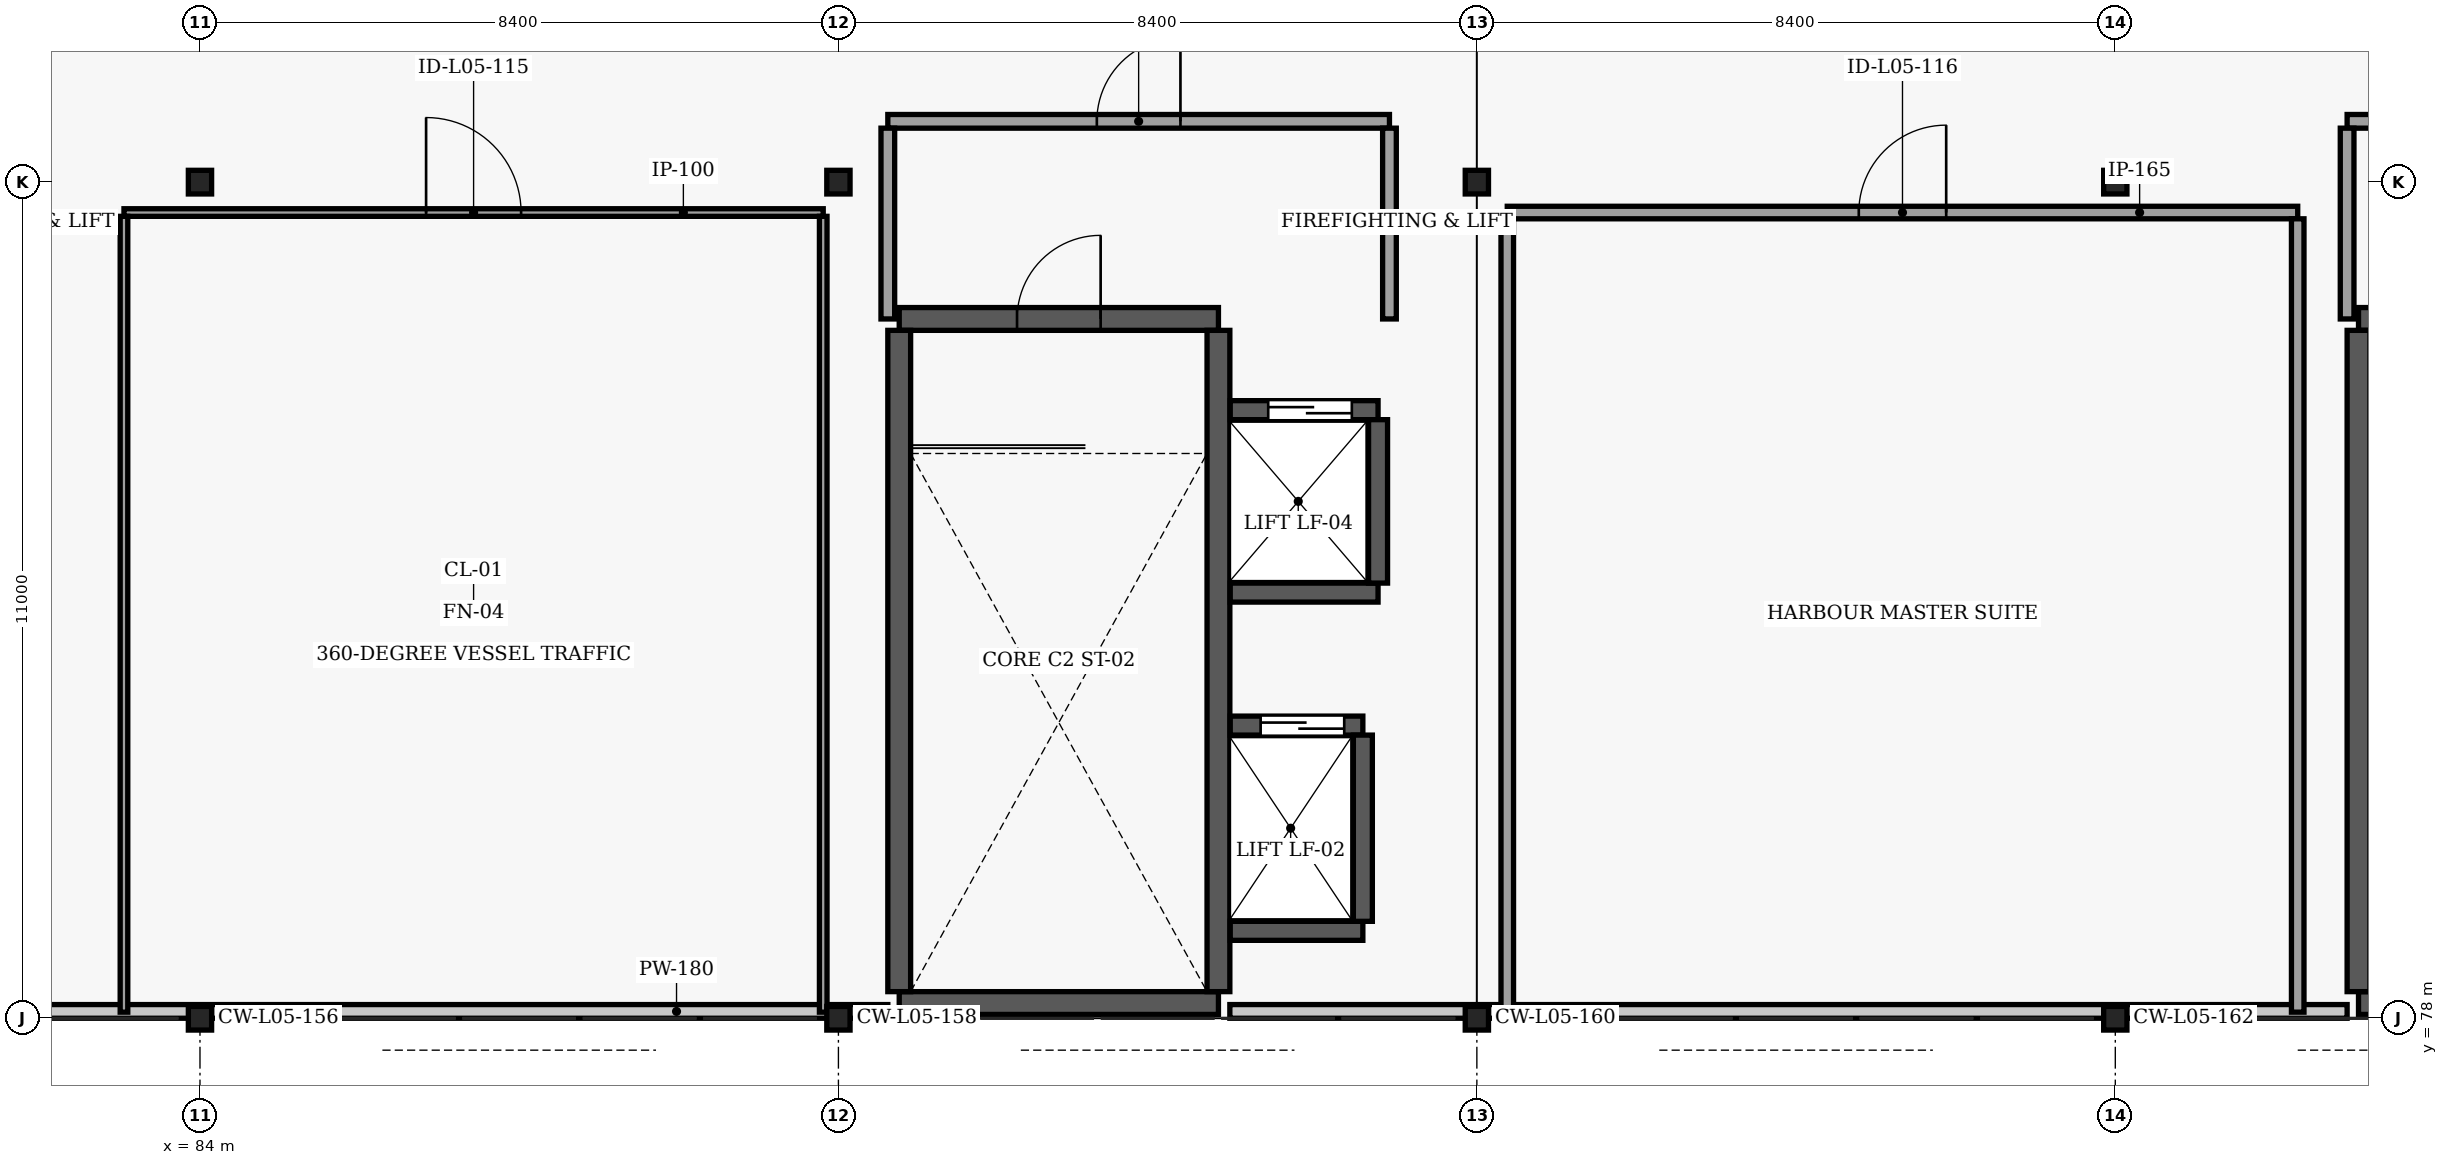
"""IFC4 building model, lengths in metres.
Left out: names, types, materials, properties, quantities, classifications, styles, units other than length and angle.
Written with IfcOpenShell. Run it as: python <this file> out.ifc"""

import sys

from ifc_helpers import new_model, si_unit, direction, frame, frame_2d, origin, origin_2d, place, context, subcontext, project, spatial, rectangle, i_section, extrude, element, fill, save


model = new_model("IFC4")
c1 = context("Model", 3, precision=1e-05, world=origin(), true_north=direction((0.0, 1.0)))
c2 = subcontext(c1, "Body", "Model", "MODEL_VIEW")
j1 = project(units=[si_unit("LENGTHUNIT", "METRE"), si_unit("PLANEANGLEUNIT", "RADIAN")], contexts=[c1])
p1 = place(None, origin())
s1 = spatial("IfcSite", under=j1, at=p1, CompositionType="ELEMENT")
p2 = place(p1, origin())
s2 = spatial("IfcBuilding", under=s1, at=p2, CompositionType="ELEMENT")
p3 = place(p2, frame((0.0, 0.0, 18.6)))
s3 = spatial("IfcBuildingStorey", under=s2, at=p3, CompositionType="ELEMENT", Elevation=18.6)
for number, where, z_axis, x_axis in (
    (1, (84.0, 78.0, 0.0), (0.0, 0.0, 1.0), (1.0, 0.0, 0.0)),
    (2, (92.4, 78.0, 0.0), (0.0, 0.0, 1.0), (1.0, 0.0, 0.0)),
    (3, (100.8, 78.0, 0.0), (0.0, 0.0, 1.0), (1.0, 0.0, 0.0)),
    (4, (109.2, 78.0, 0.0), (0.0, 0.0, 1.0), (1.0, 0.0, 0.0)),
    (5, (84.0, 89.0, 0.0), (0.0, 0.0, 1.0), (1.0, 0.0, 0.0)),
    (6, (92.4, 89.0, 0.0), (0.0, 0.0, 1.0), (1.0, 0.0, 0.0)),
    (7, (100.8, 89.0, 0.0), (0.0, 0.0, 1.0), (1.0, 0.0, 0.0)),
    (8, (109.2, 89.0, 0.0), (0.0, 0.0, 1.0), (1.0, 0.0, 0.0)),
):
    element("IfcColumn", number, at=place(p3, frame(where, z_axis=z_axis, x_axis=x_axis)), inside=s3, PredefinedType="COLUMN", context=c2, shape_type="SweptSolid", body=[
        extrude(i_section(OverallWidth=0.306, OverallDepth=0.311, WebThickness=0.011, FlangeThickness=0.017, FilletRadius=0.015, at=origin_2d()), origin(), (0.0, 0.0, 1.0), 3.96),
    ])
p4 = place(p3, frame((93.2, 78.2, 0.0), z_axis=(0.0, 0.0, 1.0), x_axis=(1.0, 0.0, 0.0)))
e9 = element("IfcWall", 9, at=p4, inside=s3, PredefinedType="SHEAR", context=c2, shape_type="SweptSolid", body=[
    extrude(rectangle(XDim=4.2, YDim=0.3, at=frame_2d((2.1, 0.0))), origin(), (0.0, 0.0, 1.0), 5.1),
])
p5 = place(p3, frame((93.2, 87.2, 0.0), z_axis=(0.0, 0.0, 1.0), x_axis=(1.0, 0.0, 0.0)))
e10 = element("IfcWall", 10, at=p5, inside=s3, PredefinedType="SHEAR", context=c2, shape_type="SweptSolid", body=[
    extrude(rectangle(XDim=4.2, YDim=0.3, at=frame_2d((2.1, 0.0))), origin(), (0.0, 0.0, 1.0), 5.1),
])
p6 = place(p5, frame((1.55, 0.0, 0.0)))
e11 = element("IfcOpeningElement", 11, at=p6, cuts=e10, PredefinedType="OPENING", context=c2, shape_type="SweptSolid", body=[
    extrude(rectangle(XDim=1.1, YDim=2.2, at=frame_2d((0.55, 1.1))), frame((0.0, 0.16, 0.0), z_axis=(0.0, -1.0, 0.0), x_axis=(1.0, 0.0, 0.0)), (0.0, 0.0, 1.0), 0.32),
])
for number, where, z_axis, x_axis in (
    (12, (93.2, 78.35, 0.0), (0.0, 0.0, 1.0), (0.0, 1.0, 0.0)),
    (13, (97.4, 78.35, 0.0), (0.0, 0.0, 1.0), (0.0, 1.0, 0.0)),
):
    element("IfcWall", number, at=place(p3, frame(where, z_axis=z_axis, x_axis=x_axis)), inside=s3, PredefinedType="SHEAR", context=c2, shape_type="SweptSolid", body=[
        extrude(rectangle(XDim=8.7, YDim=0.3, at=frame_2d((4.35, 0.0))), origin(), (0.0, 0.0, 1.0), 5.1),
    ])
p7 = place(p3, frame((97.555, 79.15, 0.0), z_axis=(0.0, 0.0, 1.0), x_axis=(1.0, 0.0, 0.0)))
e14 = element("IfcWall", 14, at=p7, inside=s3, PredefinedType="SOLIDWALL", context=c2, shape_type="SweptSolid", body=[
    extrude(rectangle(XDim=1.745, YDim=0.25, at=frame_2d((0.873, 0.0))), origin(), (0.0, 0.0, 1.0), 5.88),
])
p8 = place(p3, frame((97.555, 81.85, 0.0), z_axis=(0.0, 0.0, 1.0), x_axis=(1.0, 0.0, 0.0)))
e15 = element("IfcWall", 15, at=p8, inside=s3, PredefinedType="SOLIDWALL", context=c2, shape_type="SweptSolid", body=[
    extrude(rectangle(XDim=1.745, YDim=0.25, at=frame_2d((0.873, 0.0))), origin(), (0.0, 0.0, 1.0), 5.88),
])
p9 = place(p8, frame((0.4, 0.0, 0.0)))
e16 = element("IfcOpeningElement", 16, at=p9, cuts=e15, PredefinedType="OPENING", context=c2, shape_type="SweptSolid", body=[
    extrude(rectangle(XDim=1.1, YDim=2.2, at=frame_2d((0.55, 1.1))), frame((0.0, 0.135, 0.0), z_axis=(0.0, -1.0, 0.0), x_axis=(1.0, 0.0, 0.0)), (0.0, 0.0, 1.0), 0.27),
])
p10 = place(p3, frame((99.3, 79.275, 0.0), z_axis=(0.0, 0.0, 1.0), x_axis=(0.0, 1.0, 0.0)))
e17 = element("IfcWall", 17, at=p10, inside=s3, PredefinedType="SOLIDWALL", context=c2, shape_type="SweptSolid", body=[
    extrude(rectangle(XDim=2.45, YDim=0.25, at=frame_2d((1.225, 0.0))), origin(), (0.0, 0.0, 1.0), 5.88),
])
p11 = place(p3, frame((97.555, 83.6, 0.0), z_axis=(0.0, 0.0, 1.0), x_axis=(1.0, 0.0, 0.0)))
e18 = element("IfcWall", 18, at=p11, inside=s3, PredefinedType="SOLIDWALL", context=c2, shape_type="SweptSolid", body=[
    extrude(rectangle(XDim=1.945, YDim=0.25, at=frame_2d((0.973, 0.0))), origin(), (0.0, 0.0, 1.0), 5.88),
])
p12 = place(p3, frame((97.555, 86.0, 0.0), z_axis=(0.0, 0.0, 1.0), x_axis=(1.0, 0.0, 0.0)))
e19 = element("IfcWall", 19, at=p12, inside=s3, PredefinedType="SOLIDWALL", context=c2, shape_type="SweptSolid", body=[
    extrude(rectangle(XDim=1.945, YDim=0.25, at=frame_2d((0.973, 0.0))), origin(), (0.0, 0.0, 1.0), 5.88),
])
p13 = place(p12, frame((0.5, 0.0, 0.0)))
e20 = element("IfcOpeningElement", 20, at=p13, cuts=e19, PredefinedType="OPENING", context=c2, shape_type="SweptSolid", body=[
    extrude(rectangle(XDim=1.1, YDim=2.2, at=frame_2d((0.55, 1.1))), frame((0.0, 0.135, 0.0), z_axis=(0.0, -1.0, 0.0), x_axis=(1.0, 0.0, 0.0)), (0.0, 0.0, 1.0), 0.27),
])
p14 = place(p3, frame((99.5, 83.725, 0.0), z_axis=(0.0, 0.0, 1.0), x_axis=(0.0, 1.0, 0.0)))
e21 = element("IfcWall", 21, at=p14, inside=s3, PredefinedType="SOLIDWALL", context=c2, shape_type="SweptSolid", body=[
    extrude(rectangle(XDim=2.15, YDim=0.25, at=frame_2d((1.075, 0.0))), origin(), (0.0, 0.0, 1.0), 5.88),
])
p15 = place(p3, frame((112.4, 78.2, 0.0), z_axis=(0.0, 0.0, 1.0), x_axis=(1.0, 0.0, 0.0)))
e22 = element("IfcWall", 22, at=p15, inside=s3, PredefinedType="SHEAR", context=c2, shape_type="SweptSolid", body=[
    extrude(rectangle(XDim=4.1, YDim=0.3, at=frame_2d((2.05, 0.0))), origin(), (0.0, 0.0, 1.0), 5.1),
])
p16 = place(p3, frame((112.4, 87.2, 0.0), z_axis=(0.0, 0.0, 1.0), x_axis=(1.0, 0.0, 0.0)))
e23 = element("IfcWall", 23, at=p16, inside=s3, PredefinedType="SHEAR", context=c2, shape_type="SweptSolid", body=[
    extrude(rectangle(XDim=4.1, YDim=0.3, at=frame_2d((2.05, 0.0))), origin(), (0.0, 0.0, 1.0), 5.1),
])
p17 = place(p16, frame((1.5, 0.0, 0.0)))
e24 = element("IfcOpeningElement", 24, at=p17, cuts=e23, PredefinedType="OPENING", context=c2, shape_type="SweptSolid", body=[
    extrude(rectangle(XDim=1.1, YDim=2.2, at=frame_2d((0.55, 1.1))), frame((0.0, 0.16, 0.0), z_axis=(0.0, -1.0, 0.0), x_axis=(1.0, 0.0, 0.0)), (0.0, 0.0, 1.0), 0.32),
])
p18 = place(p3, frame((112.4, 78.35, 0.0), z_axis=(0.0, 0.0, 1.0), x_axis=(0.0, 1.0, 0.0)))
e25 = element("IfcWall", 25, at=p18, inside=s3, PredefinedType="SHEAR", context=c2, shape_type="SweptSolid", body=[
    extrude(rectangle(XDim=8.7, YDim=0.3, at=frame_2d((4.35, 0.0))), origin(), (0.0, 0.0, 1.0), 5.1),
])
p19 = place(p3, frame((79.15, 78.09, 4.2), z_axis=(0.0, 0.0, 1.0), x_axis=(1.0, 0.0, 0.0)))
e26 = element("IfcWall", 26, at=p19, inside=s3, PredefinedType="PARAPET", context=c2, shape_type="SweptSolid", body=[
    extrude(rectangle(XDim=13.9, YDim=0.18, at=frame_2d((6.95, 0.0))), origin(), (0.0, 0.0, 1.0), 1.2),
])
p20 = place(p3, frame((97.55, 78.09, 4.2), z_axis=(0.0, 0.0, 1.0), x_axis=(1.0, 0.0, 0.0)))
e27 = element("IfcWall", 27, at=p20, inside=s3, PredefinedType="PARAPET", context=c2, shape_type="SweptSolid", body=[
    extrude(rectangle(XDim=14.7, YDim=0.18, at=frame_2d((7.35, 0.0))), origin(), (0.0, 0.0, 1.0), 1.2),
])
p21 = place(p3, frame((93.05, 89.8, 0.0), z_axis=(0.0, 0.0, 1.0), x_axis=(1.0, 0.0, 0.0)))
e28 = element("IfcWall", 28, at=p21, inside=s3, PredefinedType="SOLIDWALL", context=c2, shape_type="SweptSolid", body=[
    extrude(rectangle(XDim=6.6, YDim=0.18, at=frame_2d((3.3, 0.0))), origin(), (0.0, 0.0, 1.0), 3.9),
])
p22 = place(p21, frame((2.75, 0.0, 0.0)))
e29 = element("IfcOpeningElement", 29, at=p22, cuts=e28, PredefinedType="OPENING", context=c2, shape_type="SweptSolid", body=[
    extrude(rectangle(XDim=1.1, YDim=2.2, at=frame_2d((0.55, 1.1))), frame((0.0, 0.1, 0.0), z_axis=(0.0, -1.0, 0.0), x_axis=(1.0, 0.0, 0.0)), (0.0, 0.0, 1.0), 0.2),
])
for number, where, z_axis, x_axis in (
    (30, (93.05, 87.2, 0.0), (0.0, 0.0, 1.0), (0.0, 1.0, 0.0)),
    (31, (99.65, 87.2, 0.0), (0.0, 0.0, 1.0), (0.0, 1.0, 0.0)),
):
    element("IfcWall", number, at=place(p3, frame(where, z_axis=z_axis, x_axis=x_axis)), inside=s3, PredefinedType="SOLIDWALL", context=c2, shape_type="SweptSolid", body=[
        extrude(rectangle(XDim=2.51, YDim=0.18, at=frame_2d((1.255, 0.0))), origin(), (0.0, 0.0, 1.0), 3.55),
    ])
p23 = place(p3, frame((112.25, 89.8, 0.0), z_axis=(0.0, 0.0, 1.0), x_axis=(1.0, 0.0, 0.0)))
e32 = element("IfcWall", 32, at=p23, inside=s3, PredefinedType="SOLIDWALL", context=c2, shape_type="SweptSolid", body=[
    extrude(rectangle(XDim=4.4, YDim=0.18, at=frame_2d((2.2, 0.0))), origin(), (0.0, 0.0, 1.0), 3.9),
])
p24 = place(p23, frame((1.65, 0.0, 0.0)))
e33 = element("IfcOpeningElement", 33, at=p24, cuts=e32, PredefinedType="OPENING", context=c2, shape_type="SweptSolid", body=[
    extrude(rectangle(XDim=1.1, YDim=2.2, at=frame_2d((0.55, 1.1))), frame((0.0, 0.1, 0.0), z_axis=(0.0, -1.0, 0.0), x_axis=(1.0, 0.0, 0.0)), (0.0, 0.0, 1.0), 0.2),
])
p25 = place(p3, frame((112.25, 87.2, 0.0), z_axis=(0.0, 0.0, 1.0), x_axis=(0.0, 1.0, 0.0)))
e34 = element("IfcWall", 34, at=p25, inside=s3, PredefinedType="SOLIDWALL", context=c2, shape_type="SweptSolid", body=[
    extrude(rectangle(XDim=2.51, YDim=0.18, at=frame_2d((1.255, 0.0))), origin(), (0.0, 0.0, 1.0), 3.55),
])
p26 = place(p3, frame((83.0, 88.6, 0.0), z_axis=(0.0, 0.0, 1.0), x_axis=(1.0, 0.0, 0.0)))
e35 = element("IfcWall", 35, at=p26, inside=s3, PredefinedType="MOVABLE", context=c2, shape_type="SweptSolid", body=[
    extrude(rectangle(XDim=9.2, YDim=0.1, at=frame_2d((4.6, 0.0))), origin(), (0.0, 0.0, 1.0), 3.604),
])
p27 = place(p26, frame((3.975, 0.0, 0.0)))
e36 = element("IfcOpeningElement", 36, at=p27, cuts=e35, PredefinedType="OPENING", context=c2, shape_type="SweptSolid", body=[
    extrude(rectangle(XDim=1.25, YDim=2.25, at=frame_2d((0.625, 1.125))), frame((0.0, 0.06, 0.0), z_axis=(0.0, -1.0, 0.0), x_axis=(1.0, 0.0, 0.0)), (0.0, 0.0, 1.0), 0.12),
])
p28 = place(p3, frame((83.0, 78.08, 0.0), z_axis=(0.0, 0.0, 1.0), x_axis=(0.0, 1.0, 0.0)))
e37 = element("IfcWall", 37, at=p28, inside=s3, PredefinedType="MOVABLE", context=c2, shape_type="SweptSolid", body=[
    extrude(rectangle(XDim=10.47, YDim=0.1, at=frame_2d((5.235, 0.0))), origin(), (0.0, 0.0, 1.0), 3.698),
])
p29 = place(p3, frame((92.2, 78.08, 0.0), z_axis=(0.0, 0.0, 1.0), x_axis=(0.0, 1.0, 0.0)))
e38 = element("IfcWall", 38, at=p29, inside=s3, PredefinedType="MOVABLE", context=c2, shape_type="SweptSolid", body=[
    extrude(rectangle(XDim=10.47, YDim=0.1, at=frame_2d((5.235, 0.0))), origin(), (0.0, 0.0, 1.0), 3.604),
])
p30 = place(p3, frame((101.2, 88.6, 0.0), z_axis=(0.0, 0.0, 1.0), x_axis=(1.0, 0.0, 0.0)))
e39 = element("IfcWall", 39, at=p30, inside=s3, PredefinedType="PARTITIONING", context=c2, shape_type="SweptSolid", body=[
    extrude(rectangle(XDim=10.4, YDim=0.165, at=frame_2d((5.2, 0.0))), origin(), (0.0, 0.0, 1.0), 3.604),
])
p31 = place(p30, frame((4.625, 0.0, 0.0)))
e40 = element("IfcOpeningElement", 40, at=p31, cuts=e39, PredefinedType="OPENING", context=c2, shape_type="SweptSolid", body=[
    extrude(rectangle(XDim=1.15, YDim=2.25, at=frame_2d((0.575, 1.125))), frame((0.0, 0.093, 0.0), z_axis=(0.0, -1.0, 0.0), x_axis=(1.0, 0.0, 0.0)), (0.0, 0.0, 1.0), 0.185),
])
for number, where, z_axis, x_axis in (
    (41, (101.2, 78.08, 0.0), (0.0, 0.0, 1.0), (0.0, 1.0, 0.0)),
    (42, (111.6, 78.08, 0.0), (0.0, 0.0, 1.0), (0.0, 1.0, 0.0)),
):
    element("IfcWall", number, at=place(p3, frame(where, z_axis=z_axis, x_axis=x_axis)), inside=s3, PredefinedType="PARTITIONING", context=c2, shape_type="SweptSolid", body=[
        extrude(rectangle(XDim=10.438, YDim=0.165, at=frame_2d((5.219, 0.0))), origin(), (0.0, 0.0, 1.0), 3.698),
    ])
p32 = place(p6, origin())
e43 = element("IfcDoor", 43, at=p32, inside=s3, OperationType="SINGLE_SWING_RIGHT", PredefinedType="DOOR", context=c2, shape_type="SweptSolid", body=[
    extrude(rectangle(XDim=1.1, YDim=2.2, at=frame_2d((0.55, 1.1))), frame((0.0, 0.025, 0.0), z_axis=(0.0, -1.0, 0.0), x_axis=(1.0, 0.0, 0.0)), (0.0, 0.0, 1.0), 0.05),
])
fill(e11, e43)
p33 = place(p9, origin())
e44 = element("IfcDoor", 44, at=p33, inside=s3, OperationType="SLIDING_TO_LEFT", PredefinedType="DOOR", context=c2, shape_type="SweptSolid", body=[
    extrude(rectangle(XDim=1.1, YDim=2.2, at=frame_2d((0.55, 1.1))), frame((0.0, 0.025, 0.0), z_axis=(0.0, -1.0, 0.0), x_axis=(1.0, 0.0, 0.0)), (0.0, 0.0, 1.0), 0.05),
])
fill(e16, e44)
p34 = place(p13, origin())
e45 = element("IfcDoor", 45, at=p34, inside=s3, OperationType="SLIDING_TO_LEFT", PredefinedType="DOOR", context=c2, shape_type="SweptSolid", body=[
    extrude(rectangle(XDim=1.1, YDim=2.2, at=frame_2d((0.55, 1.1))), frame((0.0, 0.025, 0.0), z_axis=(0.0, -1.0, 0.0), x_axis=(1.0, 0.0, 0.0)), (0.0, 0.0, 1.0), 0.05),
])
fill(e20, e45)
p35 = place(p22, origin())
e46 = element("IfcDoor", 46, at=p35, inside=s3, OperationType="SINGLE_SWING_RIGHT", PredefinedType="DOOR", context=c2, shape_type="SweptSolid", body=[
    extrude(rectangle(XDim=1.1, YDim=2.2, at=frame_2d((0.55, 1.1))), frame((0.0, 0.025, 0.0), z_axis=(0.0, -1.0, 0.0), x_axis=(1.0, 0.0, 0.0)), (0.0, 0.0, 1.0), 0.05),
])
fill(e29, e46)
p36 = place(p27, origin())
e47 = element("IfcDoor", 47, at=p36, inside=s3, OperationType="SINGLE_SWING_LEFT", PredefinedType="DOOR", context=c2, shape_type="SweptSolid", body=[
    extrude(rectangle(XDim=1.25, YDim=2.25, at=frame_2d((0.625, 1.125))), frame((0.0, 0.025, 0.0), z_axis=(0.0, -1.0, 0.0), x_axis=(1.0, 0.0, 0.0)), (0.0, 0.0, 1.0), 0.05),
])
fill(e36, e47)
p37 = place(p31, origin())
e48 = element("IfcDoor", 48, at=p37, inside=s3, OperationType="SINGLE_SWING_RIGHT", PredefinedType="DOOR", context=c2, shape_type="SweptSolid", body=[
    extrude(rectangle(XDim=1.15, YDim=2.25, at=frame_2d((0.575, 1.125))), frame((0.0, 0.025, 0.0), z_axis=(0.0, -1.0, 0.0), x_axis=(1.0, 0.0, 0.0)), (0.0, 0.0, 1.0), 0.05),
])
fill(e40, e48)
save(model, sys.argv[1])
